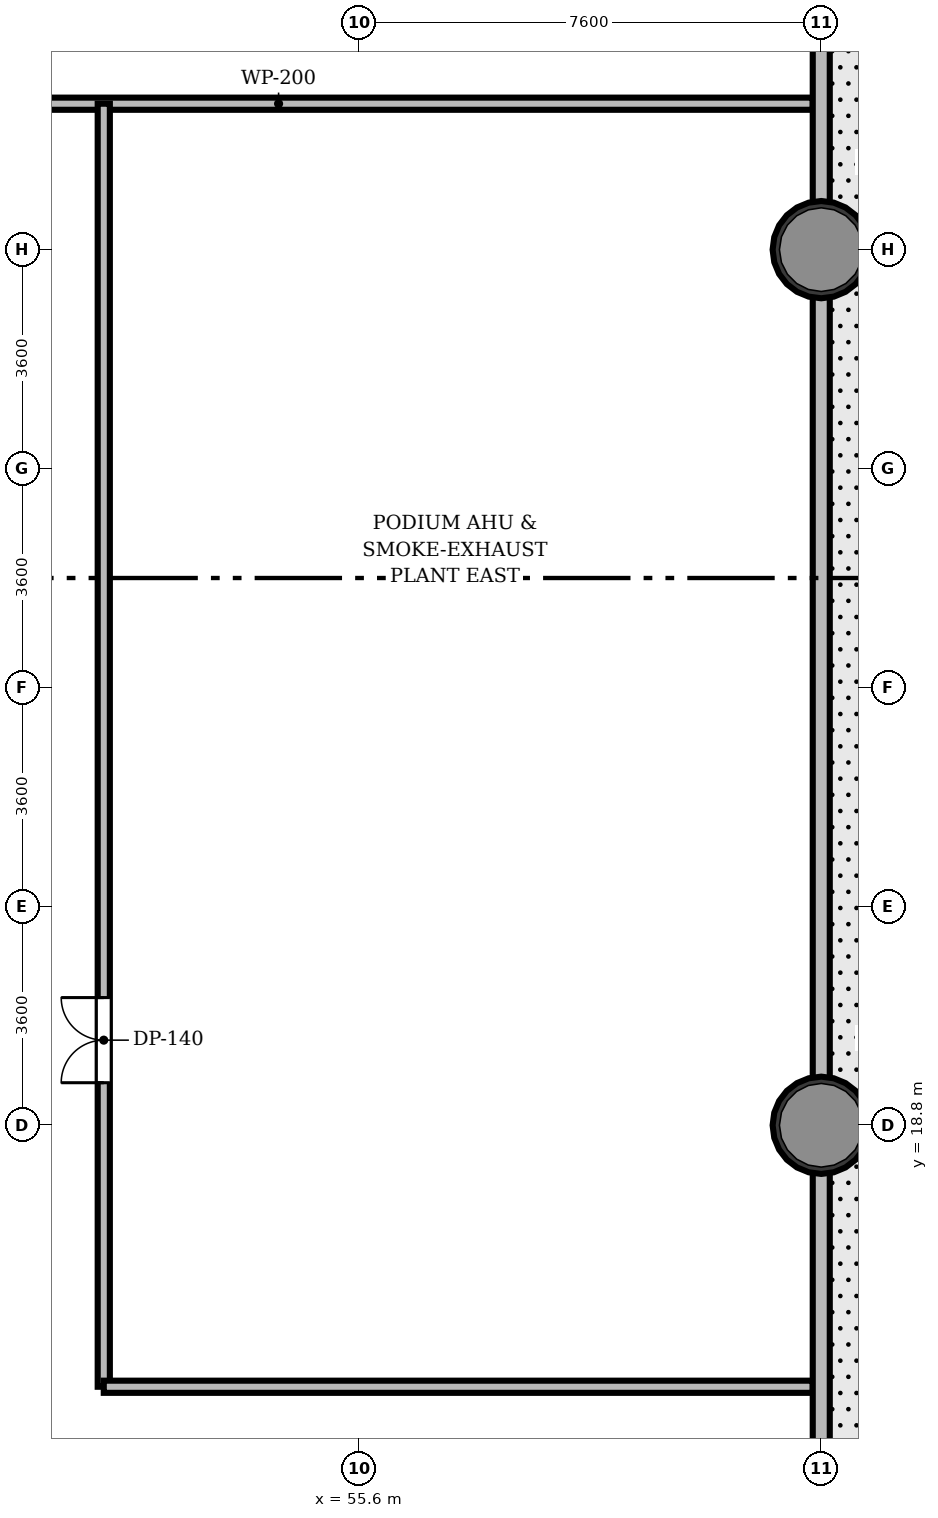
"""IFC4 building model, lengths in metres.
Left out: names, types, materials, properties, quantities, classifications, styles, units other than length and angle.
Written with IfcOpenShell. Run it as: python <this file> out.ifc"""

import sys

from ifc_helpers import new_model, si_unit, direction, frame, frame_2d, origin, origin_2d, place, context, subcontext, project, spatial, rectangle, hollow_circle, extrude, element, fill, save


model = new_model("IFC4")
c1 = context("Model", 3, precision=1e-05, world=origin(), true_north=direction((0.0, 1.0)))
c2 = subcontext(c1, "Body", "Model", "MODEL_VIEW")
j1 = project(units=[si_unit("LENGTHUNIT", "METRE"), si_unit("PLANEANGLEUNIT", "RADIAN")], contexts=[c1])
p1 = place(None, origin())
s1 = spatial("IfcSite", under=j1, at=p1, CompositionType="ELEMENT")
p2 = place(p1, origin())
s2 = spatial("IfcBuilding", under=s1, at=p2, CompositionType="ELEMENT")
p3 = place(p2, frame((0.0, 0.0, 35.4)))
s3 = spatial("IfcBuildingStorey", under=s2, at=p3, CompositionType="ELEMENT", Elevation=35.4)
for number, where, z_axis, x_axis in (
    (1, (63.2, 18.8, 0.0), (0.0, 0.0, 1.0), (1.0, 0.0, 0.0)),
    (2, (63.2, 33.2, 0.0), (0.0, 0.0, 1.0), (1.0, 0.0, 0.0)),
):
    element("IfcColumn", number, at=place(p3, frame(where, z_axis=z_axis, x_axis=x_axis)), inside=s3, PredefinedType="COLUMN", context=c2, shape_type="SweptSolid", body=[
        extrude(hollow_circle(Radius=0.8, WallThickness=0.06, at=origin_2d()), origin(), (0.0, 0.0, 1.0), 6.0),
    ])
p4 = place(p3, frame((12.94, 35.6, 0.0), z_axis=(0.0, 0.0, 1.0), x_axis=(1.0, 0.0, 0.0)))
e3 = element("IfcWall", 3, at=p4, inside=s3, PredefinedType="PARTITIONING", context=c2, shape_type="SweptSolid", body=[
    extrude(rectangle(XDim=50.12, YDim=0.2, at=frame_2d((25.06, 0.0))), origin(), (0.0, 0.0, 1.0), 4.81),
])
p5 = place(p4, frame((14.0, 0.0, 0.0)))
e4 = element("IfcOpeningElement", 4, at=p5, cuts=e3, PredefinedType="OPENING", context=c2, shape_type="SweptSolid", body=[
    extrude(rectangle(XDim=1.4, YDim=2.25, at=frame_2d((0.7, 1.125))), frame((0.0, 0.11, 0.0), z_axis=(0.0, -1.0, 0.0), x_axis=(1.0, 0.0, 0.0)), (0.0, 0.0, 1.0), 0.22),
])
p6 = place(p4, frame((31.0, 0.0, 0.0)))
e5 = element("IfcOpeningElement", 5, at=p6, cuts=e3, PredefinedType="OPENING", context=c2, shape_type="SweptSolid", body=[
    extrude(rectangle(XDim=1.4, YDim=2.25, at=frame_2d((0.7, 1.125))), frame((0.0, 0.11, 0.0), z_axis=(0.0, -1.0, 0.0), x_axis=(1.0, 0.0, 0.0)), (0.0, 0.0, 1.0), 0.22),
])
p7 = place(p3, frame((51.4, 14.5, 0.0), z_axis=(0.0, 0.0, 1.0), x_axis=(0.0, 1.0, 0.0)))
e6 = element("IfcWall", 6, at=p7, inside=s3, PredefinedType="PARTITIONING", context=c2, shape_type="SweptSolid", body=[
    extrude(rectangle(XDim=21.1, YDim=0.2, at=frame_2d((10.55, 0.0))), origin(), (0.0, 0.0, 1.0), 4.81),
])
p8 = place(p7, frame((5.0, 0.0, 0.0)))
e7 = element("IfcOpeningElement", 7, at=p8, cuts=e6, PredefinedType="OPENING", context=c2, shape_type="SweptSolid", body=[
    extrude(rectangle(XDim=1.4, YDim=2.25, at=frame_2d((0.7, 1.125))), frame((0.0, 0.11, 0.0), z_axis=(0.0, -1.0, 0.0), x_axis=(1.0, 0.0, 0.0)), (0.0, 0.0, 1.0), 0.22),
])
p9 = place(p3, frame((51.4, 14.5, 0.0), z_axis=(0.0, 0.0, 1.0), x_axis=(1.0, 0.0, 0.0)))
e8 = element("IfcWall", 8, at=p9, inside=s3, PredefinedType="PARTITIONING", context=c2, shape_type="SweptSolid", body=[
    extrude(rectangle(XDim=11.66, YDim=0.2, at=frame_2d((5.83, 0.0))), origin(), (0.0, 0.0, 1.0), 4.81),
])
p10 = place(p3, frame((63.2, 43.66, 0.0), z_axis=(0.0, 0.0, 1.0), x_axis=(0.0, -1.0, 0.0)))
e9 = element("IfcWall", 9, at=p10, inside=s3, PredefinedType="SOLIDWALL", context=c2, shape_type="SweptSolid", body=[
    extrude(rectangle(XDim=35.32, YDim=0.28, at=frame_2d((17.66, 0.0))), origin(), (0.0, 0.0, 1.0), 5.0),
])
p11 = place(p8, origin())
e10 = element("IfcDoor", 10, at=p11, inside=s3, OperationType="DOUBLE_DOOR_SINGLE_SWING", PredefinedType="DOOR", context=c2, shape_type="SweptSolid", body=[
    extrude(rectangle(XDim=1.4, YDim=2.25, at=frame_2d((0.7, 1.125))), frame((0.0, 0.025, 0.0), z_axis=(0.0, -1.0, 0.0), x_axis=(1.0, 0.0, 0.0)), (0.0, 0.0, 1.0), 0.05),
])
fill(e7, e10)
save(model, sys.argv[1])
